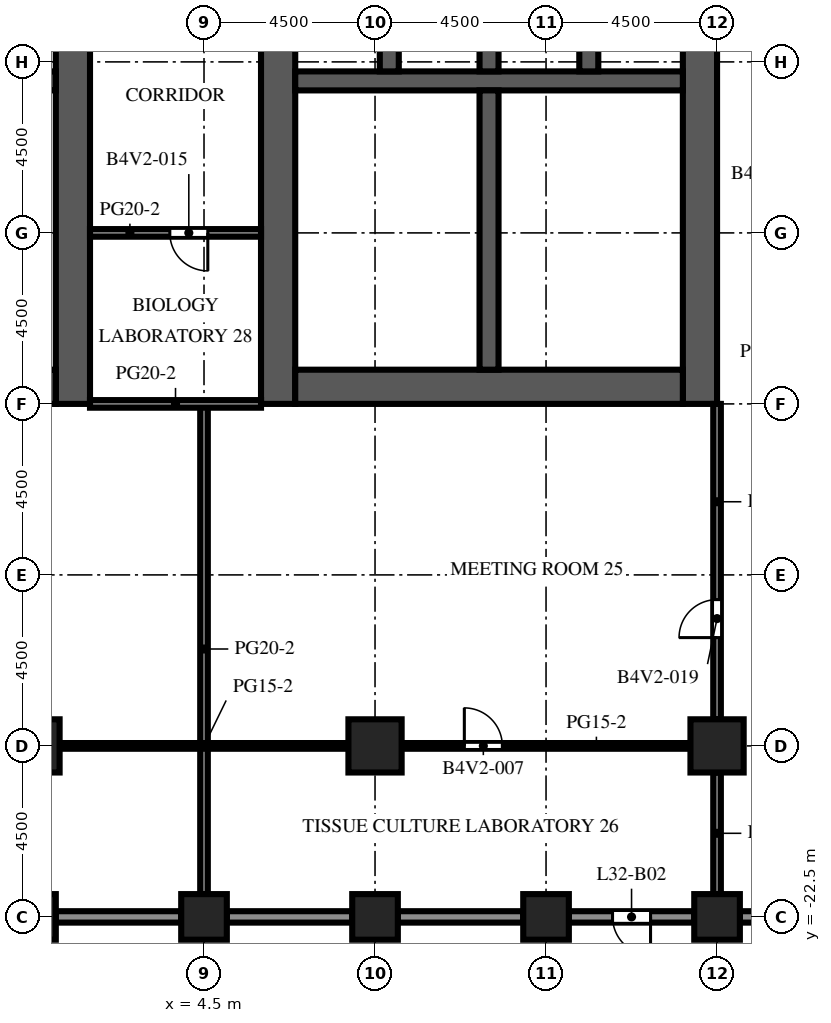
"""IFC4 building model, lengths in metres.
Left out: names, types, materials, properties, quantities, classifications, styles, units other than length and angle.
Written with IfcOpenShell. Run it as: python <this file> out.ifc"""

import sys

from ifc_helpers import new_model, si_unit, direction, frame, frame_2d, origin, origin_2d, place, context, subcontext, project, spatial, rectangle, extrude, element, fill, save


model = new_model("IFC4")
c1 = context("Model", 3, precision=1e-05, world=origin(), true_north=direction((0.0, 1.0)))
c2 = subcontext(c1, "Body", "Model", "MODEL_VIEW")
j1 = project(units=[si_unit("LENGTHUNIT", "METRE"), si_unit("PLANEANGLEUNIT", "RADIAN")], contexts=[c1])
p1 = place(None, origin())
s1 = spatial("IfcSite", under=j1, at=p1, CompositionType="ELEMENT")
p2 = place(p1, origin())
s2 = spatial("IfcBuilding", under=s1, at=p2, CompositionType="ELEMENT")
p3 = place(p2, frame((0.0, 0.0, 141.3)))
s3 = spatial("IfcBuildingStorey", under=s2, at=p3, CompositionType="ELEMENT", Elevation=141.3)
for number, where, z_axis, x_axis in (
    (1, (0.0, -22.5, 0.0), (0.0, 0.0, 1.0), (1.0, 0.0, 0.0)),
    (2, (4.5, -22.5, 0.0), (0.0, 0.0, 1.0), (1.0, 0.0, 0.0)),
    (3, (9.0, -22.5, 0.0), (0.0, 0.0, 1.0), (1.0, 0.0, 0.0)),
    (4, (13.5, -22.5, 0.0), (0.0, 0.0, 1.0), (1.0, 0.0, 0.0)),
    (5, (18.0, -22.5, 0.0), (0.0, 0.0, 1.0), (1.0, 0.0, 0.0)),
):
    element("IfcColumn", number, at=place(p3, frame(where, z_axis=z_axis, x_axis=x_axis)), inside=s3, PredefinedType="COLUMN", context=c2, shape_type="SweptSolid", body=[
        extrude(rectangle(XDim=1.2, YDim=1.2, at=origin_2d()), origin(), (0.0, 0.0, 1.0), 4.1),
    ])
for number, where, z_axis, x_axis in (
    (6, (0.0, -18.0, 0.0), (0.0, 0.0, 1.0), (1.0, 0.0, 0.0)),
    (7, (9.0, -18.0, 0.0), (0.0, 0.0, 1.0), (1.0, 0.0, 0.0)),
    (8, (18.0, -18.0, 0.0), (0.0, 0.0, 1.0), (1.0, 0.0, 0.0)),
):
    element("IfcColumn", number, at=place(p3, frame(where, z_axis=z_axis, x_axis=x_axis)), inside=s3, PredefinedType="COLUMN", context=c2, shape_type="SweptSolid", body=[
        extrude(rectangle(XDim=1.4, YDim=1.4, at=origin_2d()), origin(), (0.0, 0.0, 1.0), 4.1),
    ])
p4 = place(p3, frame((1.05, -9.0, 0.0), z_axis=(0.0, 0.0, 1.0), x_axis=(0.0, 1.0, 0.0)))
e9 = element("IfcWall", 9, at=p4, inside=s3, PredefinedType="SHEAR", context=c2, shape_type="SweptSolid", body=[
    extrude(rectangle(XDim=27.5, YDim=0.9, at=frame_2d((13.75, 0.0))), origin(), (0.0, 0.0, 1.0), 4.1),
])
p5 = place(p4, frame((12.55, 0.0, 0.0)))
e10 = element("IfcOpeningElement", 10, at=p5, cuts=e9, PredefinedType="OPENING", context=c2, shape_type="SweptSolid", body=[
    extrude(rectangle(XDim=2.4, YDim=2.4, at=frame_2d((1.2, 1.2))), frame((0.0, 0.46, 0.0), z_axis=(0.0, -1.0, 0.0), x_axis=(1.0, 0.0, 0.0)), (0.0, 0.0, 1.0), 0.92),
])
p6 = place(p4, frame((5.51, 0.0, 0.0)))
e11 = element("IfcOpeningElement", 11, at=p6, cuts=e9, PredefinedType="OPENING", context=c2, shape_type="SweptSolid", body=[
    extrude(rectangle(XDim=0.923, YDim=2.1, at=frame_2d((0.461, 1.05))), frame((0.0, 0.46, 0.0), z_axis=(0.0, -1.0, 0.0), x_axis=(1.0, 0.0, 0.0)), (0.0, 0.0, 1.0), 0.92),
])
p7 = place(p4, frame((23.427, 0.0, 0.0)))
e12 = element("IfcOpeningElement", 12, at=p7, cuts=e9, PredefinedType="OPENING", context=c2, shape_type="SweptSolid", body=[
    extrude(rectangle(XDim=1.2, YDim=2.1, at=frame_2d((0.6, 1.05))), frame((0.0, 0.46, 0.0), z_axis=(0.0, -1.0, 0.0), x_axis=(1.0, 0.0, 0.0)), (0.0, 0.0, 1.0), 0.92),
])
p8 = place(p3, frame((-9.6, -8.55, 0.0), z_axis=(0.0, 0.0, 1.0), x_axis=(1.0, 0.0, 0.0)))
e13 = element("IfcWall", 13, at=p8, inside=s3, PredefinedType="SHEAR", context=c2, shape_type="SweptSolid", body=[
    extrude(rectangle(XDim=10.2, YDim=0.9, at=frame_2d((5.1, 0.0))), origin(), (0.0, 0.0, 1.0), 4.1),
])
p9 = place(p3, frame((-9.6, -0.5, 0.0), z_axis=(0.0, 0.0, 1.0), x_axis=(1.0, 0.0, 0.0)))
e14 = element("IfcWall", 14, at=p9, inside=s3, PredefinedType="SHEAR", context=c2, shape_type="SweptSolid", body=[
    extrude(rectangle(XDim=10.2, YDim=0.5, at=frame_2d((5.1, 0.0))), origin(), (0.0, 0.0, 1.0), 4.1),
])
p10 = place(p3, frame((6.45, -9.0, 0.0), z_axis=(0.0, 0.0, 1.0), x_axis=(0.0, 1.0, 0.0)))
e15 = element("IfcWall", 15, at=p10, inside=s3, PredefinedType="SHEAR", context=c2, shape_type="SweptSolid", body=[
    extrude(rectangle(XDim=27.5, YDim=0.9, at=frame_2d((13.75, 0.0))), origin(), (0.0, 0.0, 1.0), 4.1),
])
p11 = place(p10, frame((12.55, 0.0, 0.0)))
e16 = element("IfcOpeningElement", 16, at=p11, cuts=e15, PredefinedType="OPENING", context=c2, shape_type="SweptSolid", body=[
    extrude(rectangle(XDim=2.4, YDim=2.4, at=frame_2d((1.2, 1.2))), frame((0.0, 0.46, 0.0), z_axis=(0.0, -1.0, 0.0), x_axis=(1.0, 0.0, 0.0)), (0.0, 0.0, 1.0), 0.92),
])
p12 = place(p10, frame((5.51, 0.0, 0.0)))
e17 = element("IfcOpeningElement", 17, at=p12, cuts=e15, PredefinedType="OPENING", context=c2, shape_type="SweptSolid", body=[
    extrude(rectangle(XDim=0.923, YDim=2.1, at=frame_2d((0.461, 1.05))), frame((0.0, 0.46, 0.0), z_axis=(0.0, -1.0, 0.0), x_axis=(1.0, 0.0, 0.0)), (0.0, 0.0, 1.0), 0.92),
])
p13 = place(p10, frame((23.427, 0.0, 0.0)))
e18 = element("IfcOpeningElement", 18, at=p13, cuts=e15, PredefinedType="OPENING", context=c2, shape_type="SweptSolid", body=[
    extrude(rectangle(XDim=1.2, YDim=2.1, at=frame_2d((0.6, 1.05))), frame((0.0, 0.46, 0.0), z_axis=(0.0, -1.0, 0.0), x_axis=(1.0, 0.0, 0.0)), (0.0, 0.0, 1.0), 0.92),
])
p14 = place(p3, frame((17.55, -9.0, 0.0), z_axis=(0.0, 0.0, 1.0), x_axis=(0.0, 1.0, 0.0)))
e19 = element("IfcWall", 19, at=p14, inside=s3, PredefinedType="SHEAR", context=c2, shape_type="SweptSolid", body=[
    extrude(rectangle(XDim=27.5, YDim=0.9, at=frame_2d((13.75, 0.0))), origin(), (0.0, 0.0, 1.0), 4.1),
])
p15 = place(p14, frame((12.55, 0.0, 0.0)))
e20 = element("IfcOpeningElement", 20, at=p15, cuts=e19, PredefinedType="OPENING", context=c2, shape_type="SweptSolid", body=[
    extrude(rectangle(XDim=2.4, YDim=2.4, at=frame_2d((1.2, 1.2))), frame((0.0, 0.46, 0.0), z_axis=(0.0, -1.0, 0.0), x_axis=(1.0, 0.0, 0.0)), (0.0, 0.0, 1.0), 0.92),
])
p16 = place(p14, frame((6.825, 0.0, 0.0)))
e21 = element("IfcOpeningElement", 21, at=p16, cuts=e19, PredefinedType="OPENING", context=c2, shape_type="SweptSolid", body=[
    extrude(rectangle(XDim=1.2, YDim=2.1, at=frame_2d((0.6, 1.05))), frame((0.0, 0.46, 0.0), z_axis=(0.0, -1.0, 0.0), x_axis=(1.0, 0.0, 0.0)), (0.0, 0.0, 1.0), 0.92),
])
p17 = place(p14, frame((19.475, 0.0, 0.0)))
e22 = element("IfcOpeningElement", 22, at=p17, cuts=e19, PredefinedType="OPENING", context=c2, shape_type="SweptSolid", body=[
    extrude(rectangle(XDim=1.2, YDim=2.1, at=frame_2d((0.6, 1.05))), frame((0.0, 0.46, 0.0), z_axis=(0.0, -1.0, 0.0), x_axis=(1.0, 0.0, 0.0)), (0.0, 0.0, 1.0), 0.92),
])
p18 = place(p3, frame((6.9, -8.55, 0.0), z_axis=(0.0, 0.0, 1.0), x_axis=(1.0, 0.0, 0.0)))
e23 = element("IfcWall", 23, at=p18, inside=s3, PredefinedType="SHEAR", context=c2, shape_type="SweptSolid", body=[
    extrude(rectangle(XDim=10.2, YDim=0.9, at=frame_2d((5.1, 0.0))), origin(), (0.0, 0.0, 1.0), 4.1),
])
p19 = place(p3, frame((6.9, -0.5, 0.0), z_axis=(0.0, 0.0, 1.0), x_axis=(1.0, 0.0, 0.0)))
e24 = element("IfcWall", 24, at=p19, inside=s3, PredefinedType="SHEAR", context=c2, shape_type="SweptSolid", body=[
    extrude(rectangle(XDim=10.2, YDim=0.5, at=frame_2d((5.1, 0.0))), origin(), (0.0, 0.0, 1.0), 4.1),
])
for number, where, z_axis, x_axis in (
    (25, (9.375, -0.25, 0.0), (0.0, 0.0, 1.0), (0.0, 1.0, 0.0)),
    (26, (12.0, -0.25, 0.0), (0.0, 0.0, 1.0), (0.0, 1.0, 0.0)),
    (27, (14.625, -0.25, 0.0), (0.0, 0.0, 1.0), (0.0, 1.0, 0.0)),
):
    element("IfcWall", number, at=place(p3, frame(where, z_axis=z_axis, x_axis=x_axis)), inside=s3, PredefinedType="SHEAR", context=c2, shape_type="SweptSolid", body=[
        extrude(rectangle(XDim=2.8, YDim=0.5, at=frame_2d((1.4, 0.0))), origin(), (0.0, 0.0, 1.0), 4.1),
    ])
p20 = place(p3, frame((12.0, -8.1, 0.0), z_axis=(0.0, 0.0, 1.0), x_axis=(0.0, 1.0, 0.0)))
e28 = element("IfcWall", 28, at=p20, inside=s3, PredefinedType="SHEAR", context=c2, shape_type="SweptSolid", body=[
    extrude(rectangle(XDim=7.35, YDim=0.5, at=frame_2d((3.675, 0.0))), origin(), (0.0, 0.0, 1.0), 4.1),
])
for number, where, z_axis, x_axis in (
    (29, (3.9, -22.5, 0.0), (0.0, 0.0, 1.0), (-1.0, 0.0, 0.0)),
    (30, (8.4, -22.5, 0.0), (0.0, 0.0, 1.0), (-1.0, 0.0, 0.0)),
    (31, (12.9, -22.5, 0.0), (0.0, 0.0, 1.0), (-1.0, 0.0, 0.0)),
):
    element("IfcWall", number, at=place(p3, frame(where, z_axis=z_axis, x_axis=x_axis)), inside=s3, PredefinedType="SOLIDWALL", context=c2, shape_type="SweptSolid", body=[
        extrude(rectangle(XDim=3.3, YDim=0.3, at=frame_2d((1.65, 0.0))), origin(), (0.0, 0.0, 1.0), 2.6),
    ])
p21 = place(p3, frame((17.4, -22.5, 0.0), z_axis=(0.0, 0.0, 1.0), x_axis=(-1.0, 0.0, 0.0)))
e32 = element("IfcWall", 32, at=p21, inside=s3, PredefinedType="SOLIDWALL", context=c2, shape_type="SweptSolid", body=[
    extrude(rectangle(XDim=3.3, YDim=0.3, at=frame_2d((1.65, 0.0))), origin(), (0.0, 0.0, 1.0), 2.6),
])
p22 = place(p21, frame((1.15, 0.0, 0.0)))
e33 = element("IfcOpeningElement", 33, at=p22, cuts=e32, PredefinedType="OPENING", context=c2, shape_type="SweptSolid", body=[
    extrude(rectangle(XDim=1.0, YDim=2.2, at=frame_2d((0.5, 1.1))), frame((0.0, 0.16, 0.0), z_axis=(0.0, -1.0, 0.0), x_axis=(1.0, 0.0, 0.0)), (0.0, 0.0, 1.0), 0.32),
])
p23 = place(p3, frame((21.9, -22.5, 0.0), z_axis=(0.0, 0.0, 1.0), x_axis=(-1.0, 0.0, 0.0)))
e34 = element("IfcWall", 34, at=p23, inside=s3, PredefinedType="SOLIDWALL", context=c2, shape_type="SweptSolid", body=[
    extrude(rectangle(XDim=3.3, YDim=0.3, at=frame_2d((1.65, 0.0))), origin(), (0.0, 0.0, 1.0), 2.6),
])
p24 = place(p3, frame((-1.825, -3.69, 0.0), z_axis=(0.0, 0.0, 1.0), x_axis=(1.0, 0.0, 0.0)))
e35 = element("IfcWall", 35, at=p24, inside=s3, PredefinedType="PARTITIONING", context=c2, shape_type="SweptSolid", body=[
    extrude(rectangle(XDim=2.425, YDim=0.1, at=frame_2d((1.212, 0.0))), origin(), (0.0, 0.0, 1.0), 3.5),
])
p25 = place(p24, frame((0.712, 0.0, 0.0)))
e36 = element("IfcOpeningElement", 36, at=p25, cuts=e35, PredefinedType="OPENING", context=c2, shape_type="SweptSolid", body=[
    extrude(rectangle(XDim=1.0, YDim=2.1, at=frame_2d((0.5, 1.05))), frame((0.0, 0.06, 0.0), z_axis=(0.0, -1.0, 0.0), x_axis=(1.0, 0.0, 0.0)), (0.0, 0.0, 1.0), 0.12),
])
p26 = place(p3, frame((-1.825, -2.367, 0.0), z_axis=(0.0, 0.0, 1.0), x_axis=(1.0, 0.0, 0.0)))
e37 = element("IfcWall", 37, at=p26, inside=s3, PredefinedType="PARTITIONING", context=c2, shape_type="SweptSolid", body=[
    extrude(rectangle(XDim=2.425, YDim=0.1, at=frame_2d((1.212, 0.0))), origin(), (0.0, 0.0, 1.0), 3.5),
])
p27 = place(p26, frame((0.712, 0.0, 0.0)))
e38 = element("IfcOpeningElement", 38, at=p27, cuts=e37, PredefinedType="OPENING", context=c2, shape_type="SweptSolid", body=[
    extrude(rectangle(XDim=1.0, YDim=2.1, at=frame_2d((0.5, 1.05))), frame((0.0, 0.06, 0.0), z_axis=(0.0, -1.0, 0.0), x_axis=(1.0, 0.0, 0.0)), (0.0, 0.0, 1.0), 0.12),
])
p28 = place(p3, frame((6.9, -3.69, 0.0), z_axis=(0.0, 0.0, 1.0), x_axis=(1.0, 0.0, 0.0)))
e39 = element("IfcWall", 39, at=p28, inside=s3, PredefinedType="PARTITIONING", context=c2, shape_type="SweptSolid", body=[
    extrude(rectangle(XDim=2.425, YDim=0.1, at=frame_2d((1.212, 0.0))), origin(), (0.0, 0.0, 1.0), 3.5),
])
p29 = place(p28, frame((0.712, 0.0, 0.0)))
e40 = element("IfcOpeningElement", 40, at=p29, cuts=e39, PredefinedType="OPENING", context=c2, shape_type="SweptSolid", body=[
    extrude(rectangle(XDim=1.0, YDim=2.1, at=frame_2d((0.5, 1.05))), frame((0.0, 0.06, 0.0), z_axis=(0.0, -1.0, 0.0), x_axis=(1.0, 0.0, 0.0)), (0.0, 0.0, 1.0), 0.12),
])
p30 = place(p3, frame((9.325, -3.69, 0.0), z_axis=(0.0, 0.0, 1.0), x_axis=(1.0, 0.0, 0.0)))
e41 = element("IfcWall", 41, at=p30, inside=s3, PredefinedType="PARTITIONING", context=c2, shape_type="SweptSolid", body=[
    extrude(rectangle(XDim=2.425, YDim=0.1, at=frame_2d((1.212, 0.0))), origin(), (0.0, 0.0, 1.0), 3.5),
])
p31 = place(p30, frame((0.712, 0.0, 0.0)))
e42 = element("IfcOpeningElement", 42, at=p31, cuts=e41, PredefinedType="OPENING", context=c2, shape_type="SweptSolid", body=[
    extrude(rectangle(XDim=1.0, YDim=2.1, at=frame_2d((0.5, 1.05))), frame((0.0, 0.06, 0.0), z_axis=(0.0, -1.0, 0.0), x_axis=(1.0, 0.0, 0.0)), (0.0, 0.0, 1.0), 0.12),
])
p32 = place(p3, frame((6.9, -2.367, 0.0), z_axis=(0.0, 0.0, 1.0), x_axis=(1.0, 0.0, 0.0)))
e43 = element("IfcWall", 43, at=p32, inside=s3, PredefinedType="PARTITIONING", context=c2, shape_type="SweptSolid", body=[
    extrude(rectangle(XDim=2.425, YDim=0.1, at=frame_2d((1.212, 0.0))), origin(), (0.0, 0.0, 1.0), 3.5),
])
p33 = place(p32, frame((0.712, 0.0, 0.0)))
e44 = element("IfcOpeningElement", 44, at=p33, cuts=e43, PredefinedType="OPENING", context=c2, shape_type="SweptSolid", body=[
    extrude(rectangle(XDim=1.0, YDim=2.1, at=frame_2d((0.5, 1.05))), frame((0.0, 0.06, 0.0), z_axis=(0.0, -1.0, 0.0), x_axis=(1.0, 0.0, 0.0)), (0.0, 0.0, 1.0), 0.12),
])
p34 = place(p3, frame((9.325, -2.367, 0.0), z_axis=(0.0, 0.0, 1.0), x_axis=(1.0, 0.0, 0.0)))
e45 = element("IfcWall", 45, at=p34, inside=s3, PredefinedType="PARTITIONING", context=c2, shape_type="SweptSolid", body=[
    extrude(rectangle(XDim=2.425, YDim=0.1, at=frame_2d((1.212, 0.0))), origin(), (0.0, 0.0, 1.0), 3.5),
])
p35 = place(p34, frame((0.712, 0.0, 0.0)))
e46 = element("IfcOpeningElement", 46, at=p35, cuts=e45, PredefinedType="OPENING", context=c2, shape_type="SweptSolid", body=[
    extrude(rectangle(XDim=1.0, YDim=2.1, at=frame_2d((0.5, 1.05))), frame((0.0, 0.06, 0.0), z_axis=(0.0, -1.0, 0.0), x_axis=(1.0, 0.0, 0.0)), (0.0, 0.0, 1.0), 0.12),
])
p36 = place(p3, frame((9.325, -8.1, 0.0), z_axis=(0.0, 0.0, 1.0), x_axis=(0.0, 1.0, 0.0)))
e47 = element("IfcWall", 47, at=p36, inside=s3, PredefinedType="PARTITIONING", context=c2, shape_type="SweptSolid", body=[
    extrude(rectangle(XDim=4.41, YDim=0.1, at=frame_2d((2.205, 0.0))), origin(), (0.0, 0.0, 1.0), 3.5),
])
p37 = place(p3, frame((9.325, -2.367, 0.0), z_axis=(0.0, 0.0, 1.0), x_axis=(0.0, 1.0, 0.0)))
e48 = element("IfcWall", 48, at=p37, inside=s3, PredefinedType="PARTITIONING", context=c2, shape_type="SweptSolid", body=[
    extrude(rectangle(XDim=1.617, YDim=0.1, at=frame_2d((0.809, 0.0))), origin(), (0.0, 0.0, 1.0), 3.5),
])
p38 = place(p3, frame((4.5, -21.9, 0.0), z_axis=(0.0, 0.0, 1.0), x_axis=(0.0, 1.0, 0.0)))
e49 = element("IfcWall", 49, at=p38, inside=s3, PredefinedType="PARTITIONING", context=c2, shape_type="SweptSolid", body=[
    extrude(rectangle(XDim=12.9, YDim=0.2, at=frame_2d((6.45, 0.0))), origin(), (0.0, 0.0, 1.0), 3.5),
])
p39 = place(p3, frame((18.0, -21.9, 0.0), z_axis=(0.0, 0.0, 1.0), x_axis=(0.0, 1.0, 0.0)))
e50 = element("IfcWall", 50, at=p39, inside=s3, PredefinedType="PARTITIONING", context=c2, shape_type="SweptSolid", body=[
    extrude(rectangle(XDim=3.2, YDim=0.2, at=frame_2d((1.6, 0.0))), origin(), (0.0, 0.0, 1.0), 3.5),
])
p40 = place(p3, frame((18.0, -17.3, 0.0), z_axis=(0.0, 0.0, 1.0), x_axis=(0.0, 1.0, 0.0)))
e51 = element("IfcWall", 51, at=p40, inside=s3, PredefinedType="PARTITIONING", context=c2, shape_type="SweptSolid", body=[
    extrude(rectangle(XDim=8.3, YDim=0.2, at=frame_2d((4.15, 0.0))), origin(), (0.0, 0.0, 1.0), 3.5),
])
p41 = place(p40, frame((2.15, 0.0, 0.0)))
e52 = element("IfcOpeningElement", 52, at=p41, cuts=e51, PredefinedType="OPENING", context=c2, shape_type="SweptSolid", body=[
    extrude(rectangle(XDim=1.0, YDim=2.1, at=frame_2d((0.5, 1.05))), frame((0.0, 0.11, 0.0), z_axis=(0.0, -1.0, 0.0), x_axis=(1.0, 0.0, 0.0)), (0.0, 0.0, 1.0), 0.22),
])
p42 = place(p3, frame((0.7, -18.0, 0.0), z_axis=(0.0, 0.0, 1.0), x_axis=(1.0, 0.0, 0.0)))
e53 = element("IfcWall", 53, at=p42, inside=s3, PredefinedType="PARTITIONING", context=c2, shape_type="SweptSolid", body=[
    extrude(rectangle(XDim=7.6, YDim=0.15, at=frame_2d((3.8, 0.0))), origin(), (0.0, 0.0, 1.0), 3.5),
])
p43 = place(p3, frame((17.3, -18.0, 0.0), z_axis=(0.0, 0.0, 1.0), x_axis=(-1.0, 0.0, 0.0)))
e54 = element("IfcWall", 54, at=p43, inside=s3, PredefinedType="PARTITIONING", context=c2, shape_type="SweptSolid", body=[
    extrude(rectangle(XDim=7.6, YDim=0.15, at=frame_2d((3.8, 0.0))), origin(), (0.0, 0.0, 1.0), 3.5),
])
p44 = place(p43, frame((4.95, 0.0, 0.0)))
e55 = element("IfcOpeningElement", 55, at=p44, cuts=e54, PredefinedType="OPENING", context=c2, shape_type="SweptSolid", body=[
    extrude(rectangle(XDim=1.0, YDim=2.1, at=frame_2d((0.5, 1.05))), frame((0.0, 0.085, 0.0), z_axis=(0.0, -1.0, 0.0), x_axis=(1.0, 0.0, 0.0)), (0.0, 0.0, 1.0), 0.17),
])
p45 = place(p3, frame((1.5, -9.0, 0.0), z_axis=(0.0, 0.0, 1.0), x_axis=(1.0, 0.0, 0.0)))
e56 = element("IfcWall", 56, at=p45, inside=s3, PredefinedType="PARTITIONING", context=c2, shape_type="SweptSolid", body=[
    extrude(rectangle(XDim=4.5, YDim=0.2, at=frame_2d((2.25, 0.0))), origin(), (0.0, 0.0, 1.0), 3.5),
])
p46 = place(p3, frame((6.0, -4.5, 0.0), z_axis=(0.0, 0.0, 1.0), x_axis=(-1.0, 0.0, 0.0)))
e57 = element("IfcWall", 57, at=p46, inside=s3, PredefinedType="PARTITIONING", context=c2, shape_type="SweptSolid", body=[
    extrude(rectangle(XDim=4.5, YDim=0.2, at=frame_2d((2.25, 0.0))), origin(), (0.0, 0.0, 1.0), 3.5),
])
p47 = place(p46, frame((1.4, 0.0, 0.0)))
e58 = element("IfcOpeningElement", 58, at=p47, cuts=e57, PredefinedType="OPENING", context=c2, shape_type="SweptSolid", body=[
    extrude(rectangle(XDim=1.0, YDim=2.1, at=frame_2d((0.5, 1.05))), frame((0.0, 0.11, 0.0), z_axis=(0.0, -1.0, 0.0), x_axis=(1.0, 0.0, 0.0)), (0.0, 0.0, 1.0), 0.22),
])
p48 = place(p22, origin())
e59 = element("IfcDoor", 59, at=p48, inside=s3, OperationType="SINGLE_SWING_LEFT", PredefinedType="DOOR", context=c2, shape_type="SweptSolid", body=[
    extrude(rectangle(XDim=1.0, YDim=2.2, at=frame_2d((0.5, 1.1))), frame((0.0, 0.025, 0.0), z_axis=(0.0, -1.0, 0.0), x_axis=(1.0, 0.0, 0.0)), (0.0, 0.0, 1.0), 0.05),
])
fill(e33, e59)
p49 = place(p16, frame((1.2, 0.0, 0.0), z_axis=(0.0, 0.0, 1.0), x_axis=(-1.0, 0.0, 0.0)))
e60 = element("IfcDoor", 60, at=p49, inside=s3, OperationType="SINGLE_SWING_LEFT", PredefinedType="DOOR", context=c2, shape_type="SweptSolid", body=[
    extrude(rectangle(XDim=1.2, YDim=2.1, at=frame_2d((0.6, 1.05))), frame((0.0, 0.025, 0.0), z_axis=(0.0, -1.0, 0.0), x_axis=(1.0, 0.0, 0.0)), (0.0, 0.0, 1.0), 0.05),
])
fill(e21, e60)
p50 = place(p6, origin())
e61 = element("IfcDoor", 61, at=p50, inside=s3, OperationType="SINGLE_SWING_LEFT", PredefinedType="DOOR", context=c2, shape_type="SweptSolid", body=[
    extrude(rectangle(XDim=0.923, YDim=2.1, at=frame_2d((0.461, 1.05))), frame((0.0, 0.425, 0.0), z_axis=(0.0, -1.0, 0.0), x_axis=(1.0, 0.0, 0.0)), (0.0, 0.0, 1.0), 0.05),
])
fill(e11, e61)
p51 = place(p12, origin())
e62 = element("IfcDoor", 62, at=p51, inside=s3, OperationType="SINGLE_SWING_RIGHT", PredefinedType="DOOR", context=c2, shape_type="SweptSolid", body=[
    extrude(rectangle(XDim=0.923, YDim=2.1, at=frame_2d((0.461, 1.05))), frame((0.0, -0.375, 0.0), z_axis=(0.0, -1.0, 0.0), x_axis=(1.0, 0.0, 0.0)), (0.0, 0.0, 1.0), 0.05),
])
fill(e17, e62)
p52 = place(p29, origin())
e63 = element("IfcDoor", 63, at=p52, inside=s3, OperationType="SINGLE_SWING_LEFT", PredefinedType="DOOR", context=c2, shape_type="SweptSolid", body=[
    extrude(rectangle(XDim=1.0, YDim=2.1, at=frame_2d((0.5, 1.05))), frame((0.0, 0.025, 0.0), z_axis=(0.0, -1.0, 0.0), x_axis=(1.0, 0.0, 0.0)), (0.0, 0.0, 1.0), 0.05),
])
fill(e40, e63)
p53 = place(p31, origin())
e64 = element("IfcDoor", 64, at=p53, inside=s3, OperationType="SINGLE_SWING_RIGHT", PredefinedType="DOOR", context=c2, shape_type="SweptSolid", body=[
    extrude(rectangle(XDim=1.0, YDim=2.1, at=frame_2d((0.5, 1.05))), frame((0.0, 0.025, 0.0), z_axis=(0.0, -1.0, 0.0), x_axis=(1.0, 0.0, 0.0)), (0.0, 0.0, 1.0), 0.05),
])
fill(e42, e64)
p54 = place(p33, origin())
e65 = element("IfcDoor", 65, at=p54, inside=s3, OperationType="SINGLE_SWING_LEFT", PredefinedType="DOOR", context=c2, shape_type="SweptSolid", body=[
    extrude(rectangle(XDim=1.0, YDim=2.1, at=frame_2d((0.5, 1.05))), frame((0.0, 0.025, 0.0), z_axis=(0.0, -1.0, 0.0), x_axis=(1.0, 0.0, 0.0)), (0.0, 0.0, 1.0), 0.05),
])
fill(e44, e65)
p55 = place(p35, origin())
e66 = element("IfcDoor", 66, at=p55, inside=s3, OperationType="SINGLE_SWING_RIGHT", PredefinedType="DOOR", context=c2, shape_type="SweptSolid", body=[
    extrude(rectangle(XDim=1.0, YDim=2.1, at=frame_2d((0.5, 1.05))), frame((0.0, 0.025, 0.0), z_axis=(0.0, -1.0, 0.0), x_axis=(1.0, 0.0, 0.0)), (0.0, 0.0, 1.0), 0.05),
])
fill(e46, e66)
p56 = place(p44, origin())
e67 = element("IfcDoor", 67, at=p56, inside=s3, OperationType="SINGLE_SWING_RIGHT", PredefinedType="DOOR", context=c2, shape_type="SweptSolid", body=[
    extrude(rectangle(XDim=1.0, YDim=2.1, at=frame_2d((0.5, 1.05))), frame((0.0, 0.025, 0.0), z_axis=(0.0, -1.0, 0.0), x_axis=(1.0, 0.0, 0.0)), (0.0, 0.0, 1.0), 0.05),
])
fill(e55, e67)
p57 = place(p47, origin())
e68 = element("IfcDoor", 68, at=p57, inside=s3, OperationType="SINGLE_SWING_LEFT", PredefinedType="DOOR", context=c2, shape_type="SweptSolid", body=[
    extrude(rectangle(XDim=1.0, YDim=2.1, at=frame_2d((0.5, 1.05))), frame((0.0, 0.025, 0.0), z_axis=(0.0, -1.0, 0.0), x_axis=(1.0, 0.0, 0.0)), (0.0, 0.0, 1.0), 0.05),
])
fill(e58, e68)
p58 = place(p41, origin())
e69 = element("IfcDoor", 69, at=p58, inside=s3, OperationType="SINGLE_SWING_LEFT", PredefinedType="DOOR", context=c2, shape_type="SweptSolid", body=[
    extrude(rectangle(XDim=1.0, YDim=2.1, at=frame_2d((0.5, 1.05))), frame((0.0, 0.025, 0.0), z_axis=(0.0, -1.0, 0.0), x_axis=(1.0, 0.0, 0.0)), (0.0, 0.0, 1.0), 0.05),
])
fill(e52, e69)
save(model, sys.argv[1])
